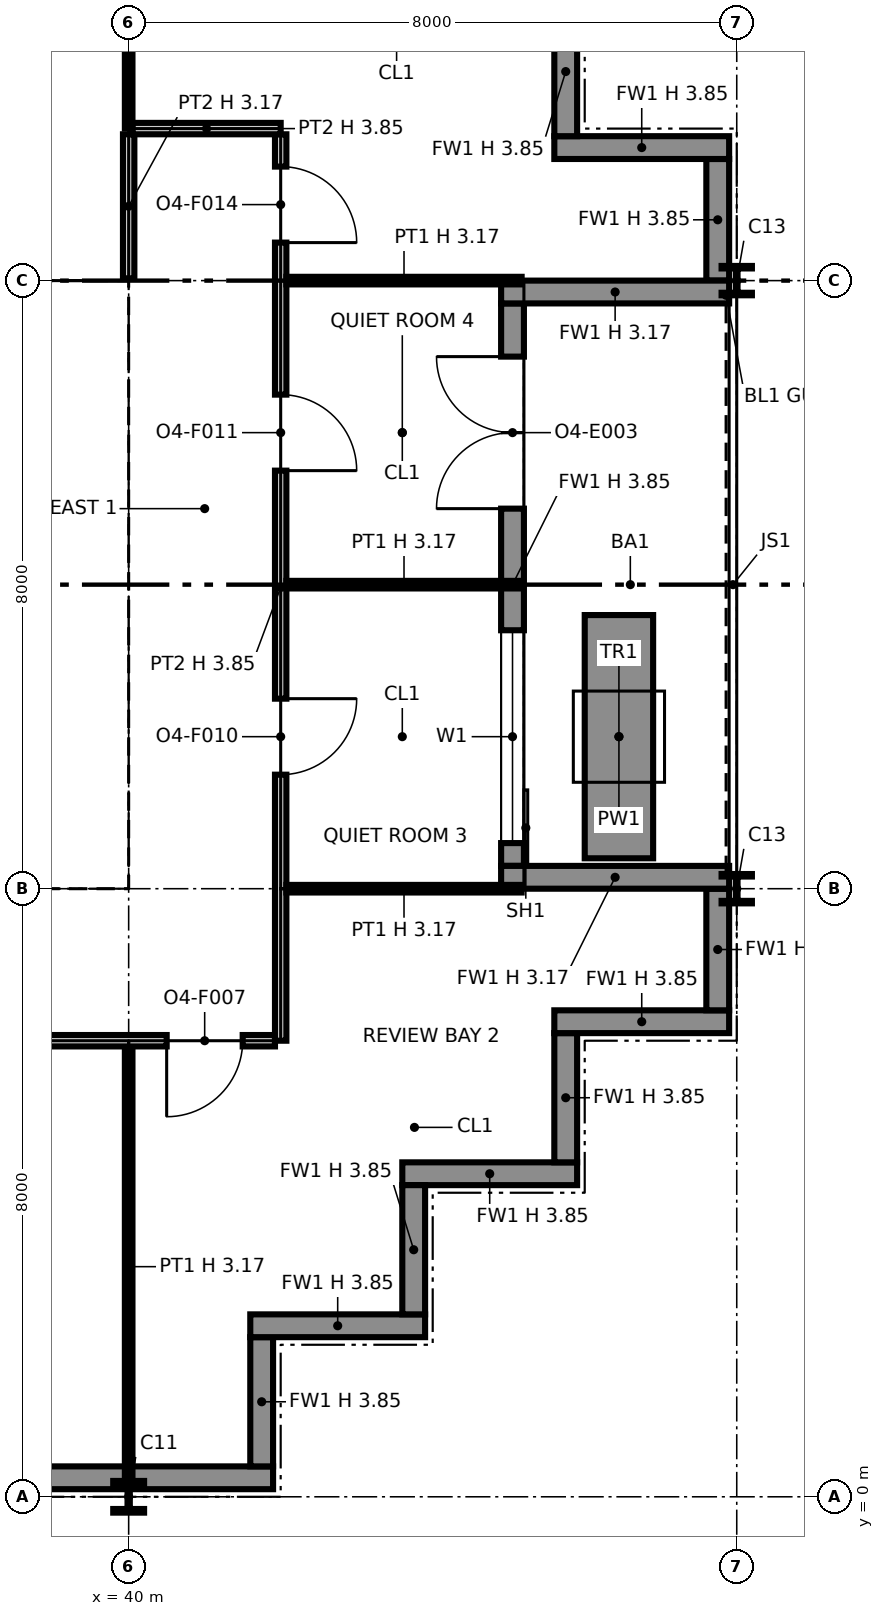
"""IFC4 building model, lengths in metres.
Left out: names, types, materials, properties, quantities, classifications, styles, units other than length and angle.
Written with IfcOpenShell. Run it as: python <this file> out.ifc"""

import sys

from ifc_helpers import new_model, si_unit, direction, frame, frame_2d, origin, origin_2d, place, context, subcontext, project, spatial, polyline, rectangle, i_section, outline, extrude, element, fill, save


model = new_model("IFC4")
c1 = context("Model", 3, precision=1e-05, world=origin(), true_north=direction((0.0, 1.0)))
c2 = subcontext(c1, "Body", "Model", "MODEL_VIEW")
j1 = project(units=[si_unit("LENGTHUNIT", "METRE"), si_unit("PLANEANGLEUNIT", "RADIAN")], contexts=[c1])
p1 = place(None, origin())
s1 = spatial("IfcSite", under=j1, at=p1, CompositionType="ELEMENT")
p2 = place(p1, origin())
s2 = spatial("IfcBuilding", under=s1, at=p2, CompositionType="ELEMENT")
p3 = place(p2, frame((0.0, 0.0, 217.0)))
s3 = spatial("IfcBuildingStorey", under=s2, at=p3, CompositionType="ELEMENT", Elevation=217.0)
p4 = place(p3, frame((40.0, 0.0, 0.0), z_axis=(0.0, 0.0, 1.0), x_axis=(1.0, 0.0, 0.0)))
e1 = element("IfcColumn", 1, at=p4, inside=s3, PredefinedType="COLUMN", context=c2, shape_type="SweptSolid", body=[
    extrude(i_section(OverallWidth=0.406, OverallDepth=0.417, WebThickness=0.03, FlangeThickness=0.048, at=origin_2d()), origin(), (0.0, 0.0, 1.0), 3.85),
])
for number, where, z_axis, x_axis in (
    (2, (40.0, 8.0, 0.0), (0.0, 0.0, 1.0), (1.0, 0.0, 0.0)),
    (3, (40.0, 16.0, 0.0), (0.0, 0.0, 1.0), (1.0, 0.0, 0.0)),
):
    element("IfcColumn", number, at=place(p3, frame(where, z_axis=z_axis, x_axis=x_axis)), inside=s3, PredefinedType="COLUMN", context=c2, shape_type="SweptSolid", body=[
        extrude(i_section(OverallWidth=0.373, OverallDepth=0.368, WebThickness=0.015, FlangeThickness=0.024, at=origin_2d()), origin(), (0.0, 0.0, 1.0), 3.85),
    ])
for number, where, z_axis, x_axis in (
    (4, (48.0, 8.0, 0.0), (0.0, 0.0, 1.0), (1.0, 0.0, 0.0)),
    (5, (48.0, 16.0, 0.0), (0.0, 0.0, 1.0), (1.0, 0.0, 0.0)),
):
    element("IfcColumn", number, at=place(p3, frame(where, z_axis=z_axis, x_axis=x_axis)), inside=s3, PredefinedType="COLUMN", context=c2, shape_type="SweptSolid", body=[
        extrude(i_section(OverallWidth=0.399, OverallDepth=0.386, WebThickness=0.021, FlangeThickness=0.033, at=origin_2d()), origin(), (0.0, 0.0, 1.0), 3.85),
    ])
p5 = place(p3, frame((32.0, 0.25, 0.0), z_axis=(0.0, 0.0, 1.0), x_axis=(1.0, 0.0, 0.0)))
e6 = element("IfcWall", 6, at=p5, inside=s3, PredefinedType="SOLIDWALL", context=c2, shape_type="SweptSolid", body=[
    extrude(rectangle(XDim=9.9, YDim=0.3, at=frame_2d((4.95, 0.0))), origin(), (0.0, 0.0, 1.0), 3.85),
])
p6 = place(p3, frame((41.75, 0.4, 0.0), z_axis=(0.0, 0.0, 1.0), x_axis=(0.0, 1.0, 0.0)))
e7 = element("IfcWall", 7, at=p6, inside=s3, PredefinedType="SOLIDWALL", context=c2, shape_type="SweptSolid", body=[
    extrude(rectangle(XDim=1.7, YDim=0.3, at=frame_2d((0.85, 0.0))), origin(), (0.0, 0.0, 1.0), 3.85),
])
p7 = place(p3, frame((41.6, 2.25, 0.0), z_axis=(0.0, 0.0, 1.0), x_axis=(1.0, 0.0, 0.0)))
e8 = element("IfcWall", 8, at=p7, inside=s3, PredefinedType="SOLIDWALL", context=c2, shape_type="SweptSolid", body=[
    extrude(rectangle(XDim=2.3, YDim=0.3, at=frame_2d((1.15, 0.0))), origin(), (0.0, 0.0, 1.0), 3.85),
])
p8 = place(p3, frame((43.75, 2.4, 0.0), z_axis=(0.0, 0.0, 1.0), x_axis=(0.0, 1.0, 0.0)))
e9 = element("IfcWall", 9, at=p8, inside=s3, PredefinedType="SOLIDWALL", context=c2, shape_type="SweptSolid", body=[
    extrude(rectangle(XDim=1.7, YDim=0.3, at=frame_2d((0.85, 0.0))), origin(), (0.0, 0.0, 1.0), 3.85),
])
p9 = place(p3, frame((43.6, 4.25, 0.0), z_axis=(0.0, 0.0, 1.0), x_axis=(1.0, 0.0, 0.0)))
e10 = element("IfcWall", 10, at=p9, inside=s3, PredefinedType="SOLIDWALL", context=c2, shape_type="SweptSolid", body=[
    extrude(rectangle(XDim=2.3, YDim=0.3, at=frame_2d((1.15, 0.0))), origin(), (0.0, 0.0, 1.0), 3.85),
])
p10 = place(p3, frame((45.75, 4.4, 0.0), z_axis=(0.0, 0.0, 1.0), x_axis=(0.0, 1.0, 0.0)))
e11 = element("IfcWall", 11, at=p10, inside=s3, PredefinedType="SOLIDWALL", context=c2, shape_type="SweptSolid", body=[
    extrude(rectangle(XDim=1.7, YDim=0.3, at=frame_2d((0.85, 0.0))), origin(), (0.0, 0.0, 1.0), 3.85),
])
p11 = place(p3, frame((45.6, 6.25, 0.0), z_axis=(0.0, 0.0, 1.0), x_axis=(1.0, 0.0, 0.0)))
e12 = element("IfcWall", 12, at=p11, inside=s3, PredefinedType="SOLIDWALL", context=c2, shape_type="SweptSolid", body=[
    extrude(rectangle(XDim=2.3, YDim=0.3, at=frame_2d((1.15, 0.0))), origin(), (0.0, 0.0, 1.0), 3.85),
])
p12 = place(p3, frame((47.75, 6.4, 0.0), z_axis=(0.0, 0.0, 1.0), x_axis=(0.0, 1.0, 0.0)))
e13 = element("IfcWall", 13, at=p12, inside=s3, PredefinedType="SOLIDWALL", context=c2, shape_type="SweptSolid", body=[
    extrude(rectangle(XDim=1.6, YDim=0.3, at=frame_2d((0.8, 0.0))), origin(), (0.0, 0.0, 1.0), 3.85),
])
p13 = place(p3, frame((45.05, 8.3, 0.0), z_axis=(0.0, 0.0, 1.0), x_axis=(0.0, 1.0, 0.0)))
e14 = element("IfcWall", 14, at=p13, inside=s3, PredefinedType="SOLIDWALL", context=c2, shape_type="SweptSolid", body=[
    extrude(rectangle(XDim=7.4, YDim=0.3, at=frame_2d((3.7, 0.0))), origin(), (0.0, 0.0, 1.0), 3.85),
])
p14 = place(p13, frame((0.3, 0.0, 0.9)))
e15 = element("IfcOpeningElement", 15, at=p14, cuts=e14, PredefinedType="OPENING", context=c2, shape_type="SweptSolid", body=[
    extrude(rectangle(XDim=2.8, YDim=2.2, at=frame_2d((1.4, 1.1))), frame((0.0, 0.16, 0.0), z_axis=(0.0, -1.0, 0.0), x_axis=(1.0, 0.0, 0.0)), (0.0, 0.0, 1.0), 0.32),
])
p15 = place(p13, frame((4.7, 0.0, 0.0)))
e16 = element("IfcOpeningElement", 16, at=p15, cuts=e14, PredefinedType="OPENING", context=c2, shape_type="SweptSolid", body=[
    extrude(rectangle(XDim=2.0, YDim=2.4, at=frame_2d((1.0, 1.2))), frame((0.0, 0.16, 0.0), z_axis=(0.0, -1.0, 0.0), x_axis=(1.0, 0.0, 0.0)), (0.0, 0.0, 1.0), 0.32),
])
for number, where, z_axis, x_axis in (
    (17, (47.9, 8.15, 0.0), (0.0, 0.0, 1.0), (-1.0, 0.0, 0.0)),
    (18, (47.9, 15.85, 0.0), (0.0, 0.0, 1.0), (-1.0, 0.0, 0.0)),
):
    element("IfcWall", number, at=place(p3, frame(where, z_axis=z_axis, x_axis=x_axis)), inside=s3, PredefinedType="SOLIDWALL", context=c2, shape_type="SweptSolid", body=[
        extrude(rectangle(XDim=3.0, YDim=0.3, at=frame_2d((1.5, 0.0))), origin(), (0.0, 0.0, 1.0), 3.171),
    ])
p16 = place(p3, frame((47.75, 16.0, 0.0), z_axis=(0.0, 0.0, 1.0), x_axis=(0.0, 1.0, 0.0)))
e19 = element("IfcWall", 19, at=p16, inside=s3, PredefinedType="SOLIDWALL", context=c2, shape_type="SweptSolid", body=[
    extrude(rectangle(XDim=1.6, YDim=0.3, at=frame_2d((0.8, 0.0))), origin(), (0.0, 0.0, 1.0), 3.85),
])
p17 = place(p3, frame((46.45, 8.4, 0.0), z_axis=(0.0, 0.0, 1.0), x_axis=(0.0, 1.0, 0.0)))
e20 = element("IfcWall", 20, at=p17, inside=s3, PredefinedType="SOLIDWALL", context=c2, shape_type="SweptSolid", body=[
    extrude(rectangle(XDim=3.2, YDim=0.9, at=frame_2d((1.6, 0.0))), origin(), (0.0, 0.0, 1.0), 0.6),
])
p18 = place(p3, frame((47.9, 17.75, 0.0), z_axis=(0.0, 0.0, 1.0), x_axis=(-1.0, 0.0, 0.0)))
e21 = element("IfcWall", 21, at=p18, inside=s3, PredefinedType="SOLIDWALL", context=c2, shape_type="SweptSolid", body=[
    extrude(rectangle(XDim=2.3, YDim=0.3, at=frame_2d((1.15, 0.0))), origin(), (0.0, 0.0, 1.0), 3.85),
])
p19 = place(p3, frame((45.75, 17.9, 0.0), z_axis=(0.0, 0.0, 1.0), x_axis=(0.0, 1.0, 0.0)))
e22 = element("IfcWall", 22, at=p19, inside=s3, PredefinedType="SOLIDWALL", context=c2, shape_type="SweptSolid", body=[
    extrude(rectangle(XDim=1.7, YDim=0.3, at=frame_2d((0.85, 0.0))), origin(), (0.0, 0.0, 1.0), 3.85),
])
p20 = place(p3, frame((24.65, 8.75, 0.0), z_axis=(0.0, 0.0, 1.0), x_axis=(1.0, 0.0, 0.0)))
e23 = element("IfcWall", 23, at=p20, inside=s3, PredefinedType="PARTITIONING", context=c2, shape_type="SweptSolid", body=[
    extrude(outline(polyline([(0.0, 0.0), (14.7, 0.0), (14.7, 3.85), (7.438, 3.85), (7.438, 3.308), (7.262, 3.308), (7.261, 3.85), (0.0, 3.85), (0.0, 0.0)])), frame((0.0, 0.1, 0.0), z_axis=(0.0, -1.0, 0.0), x_axis=(1.0, 0.0, 0.0)), (0.0, 0.0, 1.0), 0.2),
])
p21 = place(p3, frame((24.65, 15.25, 0.0), z_axis=(0.0, 0.0, 1.0), x_axis=(1.0, 0.0, 0.0)))
e24 = element("IfcWall", 24, at=p21, inside=s3, PredefinedType="PARTITIONING", context=c2, shape_type="SweptSolid", body=[
    extrude(outline(polyline([(0.0, 0.0), (14.7, 0.0), (14.7, 3.85), (7.438, 3.85), (7.438, 3.308), (7.262, 3.308), (7.261, 3.85), (0.0, 3.85), (0.0, 0.0)])), frame((0.0, 0.1, 0.0), z_axis=(0.0, -1.0, 0.0), x_axis=(1.0, 0.0, 0.0)), (0.0, 0.0, 1.0), 0.2),
])
p22 = place(p21, frame((2.85, 0.0, 0.0)))
e25 = element("IfcOpeningElement", 25, at=p22, cuts=e24, PredefinedType="OPENING", context=c2, shape_type="SweptSolid", body=[
    extrude(rectangle(XDim=1.8, YDim=2.1, at=frame_2d((0.9, 1.05))), frame((0.0, 0.11, 0.0), z_axis=(0.0, -1.0, 0.0), x_axis=(1.0, 0.0, 0.0)), (0.0, 0.0, 1.0), 0.22),
])
p23 = place(p21, frame((9.95, 0.0, 0.0), z_axis=(0.0, 0.0, 1.0), x_axis=(-1.0, 0.0, 0.0)))
e26 = element("IfcOpeningElement", 26, at=p23, cuts=e24, PredefinedType="OPENING", context=c2, shape_type="SweptSolid", body=[
    extrude(rectangle(XDim=1.4, YDim=2.1, at=frame_2d((0.7, 1.05))), frame((0.0, 0.11, 0.0), z_axis=(0.0, -1.0, 0.0), x_axis=(1.0, 0.0, 0.0)), (0.0, 0.0, 1.0), 0.22),
])
p24 = place(p21, frame((13.4, 0.0, 0.0), z_axis=(0.0, 0.0, 1.0), x_axis=(-1.0, 0.0, 0.0)))
e27 = element("IfcOpeningElement", 27, at=p24, cuts=e24, PredefinedType="OPENING", context=c2, shape_type="SweptSolid", body=[
    extrude(rectangle(XDim=1.4, YDim=2.1, at=frame_2d((0.7, 1.05))), frame((0.0, 0.11, 0.0), z_axis=(0.0, -1.0, 0.0), x_axis=(1.0, 0.0, 0.0)), (0.0, 0.0, 1.0), 0.22),
])
p25 = place(p3, frame((39.25, 8.85, 0.0), z_axis=(0.0, 0.0, 1.0), x_axis=(0.0, 1.0, 0.0)))
e28 = element("IfcWall", 28, at=p25, inside=s3, PredefinedType="PARTITIONING", context=c2, shape_type="SweptSolid", body=[
    extrude(rectangle(XDim=6.3, YDim=0.2, at=frame_2d((3.15, 0.0))), origin(), (0.0, 0.0, 1.0), 3.85),
])
p26 = place(p3, frame((40.0, 0.13, 0.0), z_axis=(0.0, 0.0, 1.0), x_axis=(0.0, 1.0, 0.0)))
e29 = element("IfcWall", 29, at=p26, inside=s3, PredefinedType="PARTITIONING", context=c2, shape_type="SweptSolid", body=[
    extrude(rectangle(XDim=5.795, YDim=0.1, at=frame_2d((2.897, 0.0))), origin(), (0.0, 0.0, 1.0), 3.172),
])
p27 = place(p3, frame((6.075, 6.0, 0.0), z_axis=(0.0, 0.0, 1.0), x_axis=(1.0, 0.0, 0.0)))
e30 = element("IfcWall", 30, at=p27, inside=s3, PredefinedType="PARTITIONING", context=c2, shape_type="SweptSolid", body=[
    extrude(rectangle(XDim=35.85, YDim=0.15, at=frame_2d((17.925, 0.0))), origin(), (0.0, 0.0, 1.0), 3.85),
])
p28 = place(p27, frame((12.425, 0.0, 0.0), z_axis=(0.0, 0.0, 1.0), x_axis=(-1.0, 0.0, 0.0)))
e31 = element("IfcOpeningElement", 31, at=p28, cuts=e30, PredefinedType="OPENING", context=c2, shape_type="SweptSolid", body=[
    extrude(rectangle(XDim=1.0, YDim=2.1, at=frame_2d((0.5, 1.05))), frame((0.0, 0.085, 0.0), z_axis=(0.0, -1.0, 0.0), x_axis=(1.0, 0.0, 0.0)), (0.0, 0.0, 1.0), 0.17),
])
p29 = place(p27, frame((16.425, 0.0, 0.0), z_axis=(0.0, 0.0, 1.0), x_axis=(-1.0, 0.0, 0.0)))
e32 = element("IfcOpeningElement", 32, at=p29, cuts=e30, PredefinedType="OPENING", context=c2, shape_type="SweptSolid", body=[
    extrude(rectangle(XDim=1.0, YDim=2.1, at=frame_2d((0.5, 1.05))), frame((0.0, 0.085, 0.0), z_axis=(0.0, -1.0, 0.0), x_axis=(1.0, 0.0, 0.0)), (0.0, 0.0, 1.0), 0.17),
])
p30 = place(p27, frame((30.425, 0.0, 0.0), z_axis=(0.0, 0.0, 1.0), x_axis=(-1.0, 0.0, 0.0)))
e33 = element("IfcOpeningElement", 33, at=p30, cuts=e30, PredefinedType="OPENING", context=c2, shape_type="SweptSolid", body=[
    extrude(rectangle(XDim=1.0, YDim=2.1, at=frame_2d((0.5, 1.05))), frame((0.0, 0.085, 0.0), z_axis=(0.0, -1.0, 0.0), x_axis=(1.0, 0.0, 0.0)), (0.0, 0.0, 1.0), 0.17),
])
p31 = place(p27, frame((6.425, 0.0, 0.0), z_axis=(0.0, 0.0, 1.0), x_axis=(-1.0, 0.0, 0.0)))
e34 = element("IfcOpeningElement", 34, at=p31, cuts=e30, PredefinedType="OPENING", context=c2, shape_type="SweptSolid", body=[
    extrude(rectangle(XDim=1.0, YDim=2.1, at=frame_2d((0.5, 1.05))), frame((0.0, 0.085, 0.0), z_axis=(0.0, -1.0, 0.0), x_axis=(1.0, 0.0, 0.0)), (0.0, 0.0, 1.0), 0.17),
])
p32 = place(p27, frame((23.425, 0.0, 0.0), z_axis=(0.0, 0.0, 1.0), x_axis=(-1.0, 0.0, 0.0)))
e35 = element("IfcOpeningElement", 35, at=p32, cuts=e30, PredefinedType="OPENING", context=c2, shape_type="SweptSolid", body=[
    extrude(rectangle(XDim=1.0, YDim=2.1, at=frame_2d((0.5, 1.05))), frame((0.0, 0.085, 0.0), z_axis=(0.0, -1.0, 0.0), x_axis=(1.0, 0.0, 0.0)), (0.0, 0.0, 1.0), 0.17),
])
p33 = place(p27, frame((35.425, 0.0, 0.0), z_axis=(0.0, 0.0, 1.0), x_axis=(-1.0, 0.0, 0.0)))
e36 = element("IfcOpeningElement", 36, at=p33, cuts=e30, PredefinedType="OPENING", context=c2, shape_type="SweptSolid", body=[
    extrude(rectangle(XDim=1.0, YDim=2.1, at=frame_2d((0.5, 1.05))), frame((0.0, 0.085, 0.0), z_axis=(0.0, -1.0, 0.0), x_axis=(1.0, 0.0, 0.0)), (0.0, 0.0, 1.0), 0.17),
])
p34 = place(p3, frame((42.0, 6.0, 0.0), z_axis=(0.0, 0.0, 1.0), x_axis=(0.0, 1.0, 0.0)))
e37 = element("IfcWall", 37, at=p34, inside=s3, PredefinedType="PARTITIONING", context=c2, shape_type="SweptSolid", body=[
    extrude(outline(polyline([(0.0, 0.0), (11.925, 0.0), (11.925, 3.85), (10.3, 3.85), (10.298, 3.172), (9.702, 3.172), (9.7, 3.85), (6.3, 3.85), (6.298, 3.172), (5.702, 3.172), (5.7, 3.85), (2.3, 3.85), (2.298, 3.172), (1.702, 3.172), (1.7, 3.85), (0.0, 3.85), (0.0, 0.0)])), frame((0.0, 0.075, 0.0), z_axis=(0.0, -1.0, 0.0), x_axis=(1.0, 0.0, 0.0)), (0.0, 0.0, 1.0), 0.15),
])
p35 = place(p34, frame((4.5, 0.0, 0.0), z_axis=(0.0, 0.0, 1.0), x_axis=(-1.0, 0.0, 0.0)))
e38 = element("IfcOpeningElement", 38, at=p35, cuts=e37, PredefinedType="OPENING", context=c2, shape_type="SweptSolid", body=[
    extrude(rectangle(XDim=1.0, YDim=2.1, at=frame_2d((0.5, 1.05))), frame((0.0, 0.085, 0.0), z_axis=(0.0, -1.0, 0.0), x_axis=(1.0, 0.0, 0.0)), (0.0, 0.0, 1.0), 0.17),
])
p36 = place(p34, frame((8.5, 0.0, 0.0), z_axis=(0.0, 0.0, 1.0), x_axis=(-1.0, 0.0, 0.0)))
e39 = element("IfcOpeningElement", 39, at=p36, cuts=e37, PredefinedType="OPENING", context=c2, shape_type="SweptSolid", body=[
    extrude(rectangle(XDim=1.0, YDim=2.1, at=frame_2d((0.5, 1.05))), frame((0.0, 0.085, 0.0), z_axis=(0.0, -1.0, 0.0), x_axis=(1.0, 0.0, 0.0)), (0.0, 0.0, 1.0), 0.17),
])
p37 = place(p34, frame((11.5, 0.0, 0.0), z_axis=(0.0, 0.0, 1.0), x_axis=(-1.0, 0.0, 0.0)))
e40 = element("IfcOpeningElement", 40, at=p37, cuts=e37, PredefinedType="OPENING", context=c2, shape_type="SweptSolid", body=[
    extrude(rectangle(XDim=1.0, YDim=2.1, at=frame_2d((0.5, 1.05))), frame((0.0, 0.085, 0.0), z_axis=(0.0, -1.0, 0.0), x_axis=(1.0, 0.0, 0.0)), (0.0, 0.0, 1.0), 0.17),
])
for number, where, z_axis, x_axis in (
    (41, (42.075, 8.0, 0.0), (0.0, 0.0, 1.0), (1.0, 0.0, 0.0)),
    (42, (42.075, 12.0, 0.0), (0.0, 0.0, 1.0), (1.0, 0.0, 0.0)),
    (43, (42.075, 16.0, 0.0), (0.0, 0.0, 1.0), (1.0, 0.0, 0.0)),
):
    element("IfcWall", number, at=place(p3, frame(where, z_axis=z_axis, x_axis=x_axis)), inside=s3, PredefinedType="PARTITIONING", context=c2, shape_type="SweptSolid", body=[
        extrude(rectangle(XDim=3.095, YDim=0.1, at=frame_2d((1.547, 0.0))), origin(), (0.0, 0.0, 1.0), 3.172),
    ])
p38 = place(p3, frame((40.0, 16.03, 0.0), z_axis=(0.0, 0.0, 1.0), x_axis=(0.0, 1.0, 0.0)))
e44 = element("IfcWall", 44, at=p38, inside=s3, PredefinedType="PARTITIONING", context=c2, shape_type="SweptSolid", body=[
    extrude(rectangle(XDim=1.895, YDim=0.15, at=frame_2d((0.948, 0.0))), origin(), (0.0, 0.0, 1.0), 3.172),
])
p39 = place(p3, frame((40.05, 18.0, 0.0), z_axis=(0.0, 0.0, 1.0), x_axis=(1.0, 0.0, 0.0)))
e45 = element("IfcWall", 45, at=p39, inside=s3, PredefinedType="PARTITIONING", context=c2, shape_type="SweptSolid", body=[
    extrude(rectangle(XDim=1.95, YDim=0.15, at=frame_2d((0.975, 0.0))), origin(), (0.0, 0.0, 1.0), 3.85),
])
p40 = place(p3, frame((40.0, 18.0, 0.0), z_axis=(0.0, 0.0, 1.0), x_axis=(0.0, 1.0, 0.0)))
e46 = element("IfcWall", 46, at=p40, inside=s3, PredefinedType="PARTITIONING", context=c2, shape_type="SweptSolid", body=[
    extrude(rectangle(XDim=3.17, YDim=0.1, at=frame_2d((1.585, 0.0))), origin(), (0.0, 0.0, 1.0), 3.172),
])
p41 = place(p14, origin())
e47 = element("IfcWindow", 47, at=p41, inside=s3, PartitioningType="SINGLE_PANEL", PredefinedType="WINDOW", context=c2, shape_type="SweptSolid", body=[
    extrude(rectangle(XDim=2.8, YDim=2.2, at=frame_2d((1.4, 1.1))), frame((0.0, 0.03, 0.0), z_axis=(0.0, -1.0, 0.0), x_axis=(1.0, 0.0, 0.0)), (0.0, 0.0, 1.0), 0.06),
])
fill(e15, e47)
p42 = place(p15, origin())
e48 = element("IfcDoor", 48, at=p42, inside=s3, OperationType="DOUBLE_DOOR_SINGLE_SWING", PredefinedType="DOOR", context=c2, shape_type="SweptSolid", body=[
    extrude(rectangle(XDim=2.0, YDim=2.4, at=frame_2d((1.0, 1.2))), frame((0.0, 0.025, 0.0), z_axis=(0.0, -1.0, 0.0), x_axis=(1.0, 0.0, 0.0)), (0.0, 0.0, 1.0), 0.05),
])
fill(e16, e48)
p43 = place(p33, origin())
e49 = element("IfcDoor", 49, at=p43, inside=s3, OperationType="SINGLE_SWING_RIGHT", PredefinedType="DOOR", context=c2, shape_type="SweptSolid", body=[
    extrude(rectangle(XDim=1.0, YDim=2.1, at=frame_2d((0.5, 1.05))), frame((0.0, 0.025, 0.0), z_axis=(0.0, -1.0, 0.0), x_axis=(1.0, 0.0, 0.0)), (0.0, 0.0, 1.0), 0.05),
])
fill(e36, e49)
p44 = place(p35, origin())
e50 = element("IfcDoor", 50, at=p44, inside=s3, OperationType="SINGLE_SWING_LEFT", PredefinedType="DOOR", context=c2, shape_type="SweptSolid", body=[
    extrude(rectangle(XDim=1.0, YDim=2.1, at=frame_2d((0.5, 1.05))), frame((0.0, 0.025, 0.0), z_axis=(0.0, -1.0, 0.0), x_axis=(1.0, 0.0, 0.0)), (0.0, 0.0, 1.0), 0.05),
])
fill(e38, e50)
p45 = place(p36, origin())
e51 = element("IfcDoor", 51, at=p45, inside=s3, OperationType="SINGLE_SWING_RIGHT", PredefinedType="DOOR", context=c2, shape_type="SweptSolid", body=[
    extrude(rectangle(XDim=1.0, YDim=2.1, at=frame_2d((0.5, 1.05))), frame((0.0, 0.025, 0.0), z_axis=(0.0, -1.0, 0.0), x_axis=(1.0, 0.0, 0.0)), (0.0, 0.0, 1.0), 0.05),
])
fill(e39, e51)
p46 = place(p37, origin())
e52 = element("IfcDoor", 52, at=p46, inside=s3, OperationType="SINGLE_SWING_RIGHT", PredefinedType="DOOR", context=c2, shape_type="SweptSolid", body=[
    extrude(rectangle(XDim=1.0, YDim=2.1, at=frame_2d((0.5, 1.05))), frame((0.0, 0.025, 0.0), z_axis=(0.0, -1.0, 0.0), x_axis=(1.0, 0.0, 0.0)), (0.0, 0.0, 1.0), 0.05),
])
fill(e40, e52)
save(model, sys.argv[1])
